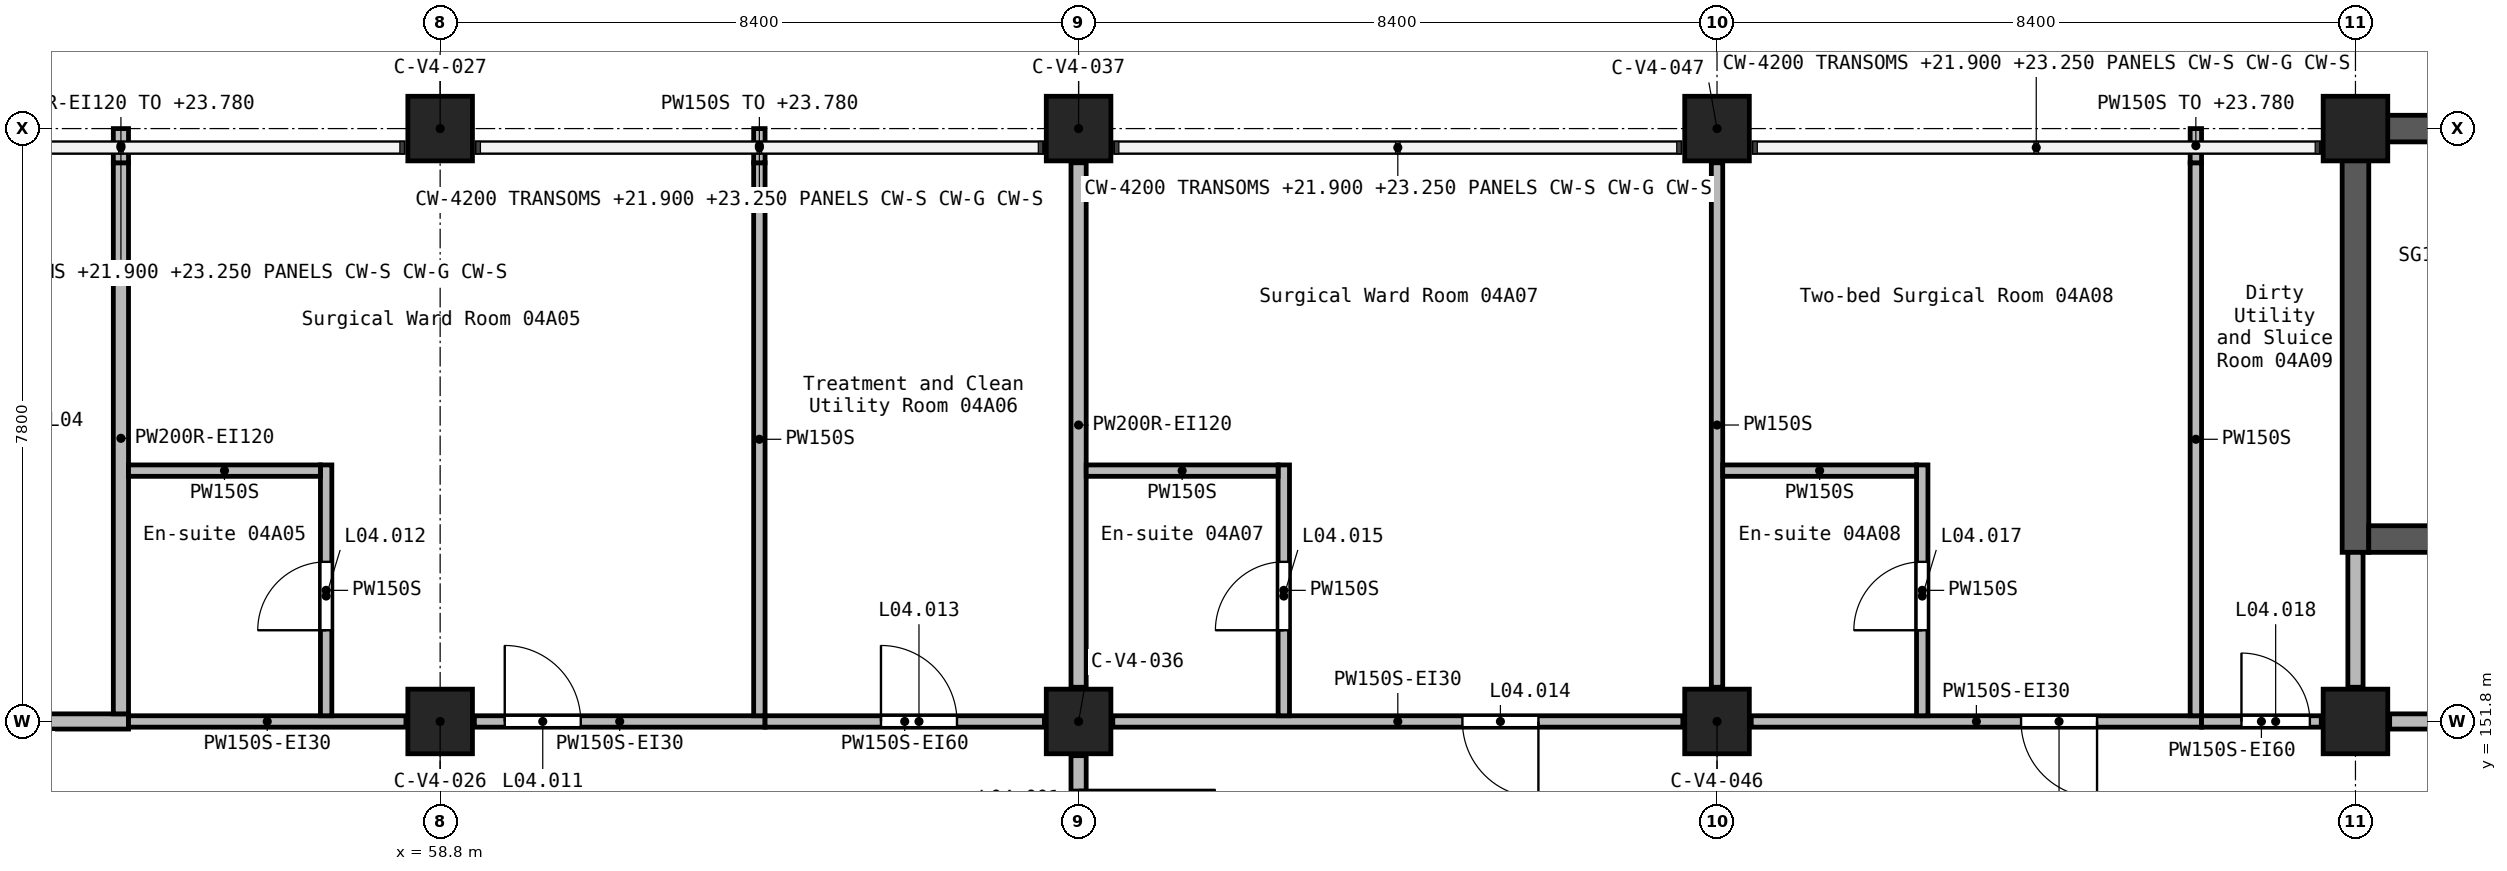
"""IFC4 building model, lengths in metres.
Left out: names, types, materials, properties, quantities, classifications, styles, units other than length and angle.
Written with IfcOpenShell. Run it as: python <this file> out.ifc"""

import sys

from ifc_helpers import new_model, si_unit, direction, frame, frame_2d, origin, origin_2d, place, context, subcontext, project, spatial, rectangle, extrude, element, fill, save


model = new_model("IFC4")
c1 = context("Model", 3, precision=1e-05, world=origin(), true_north=direction((0.0, 1.0)))
c2 = subcontext(c1, "Body", "Model", "MODEL_VIEW")
j1 = project(units=[si_unit("LENGTHUNIT", "METRE"), si_unit("PLANEANGLEUNIT", "RADIAN")], contexts=[c1])
p1 = place(None, origin())
s1 = spatial("IfcSite", under=j1, at=p1, CompositionType="ELEMENT")
p2 = place(p1, origin())
s2 = spatial("IfcBuilding", under=s1, at=p2, CompositionType="ELEMENT")
p3 = place(p2, frame((0.0, 0.0, 21.0)))
s3 = spatial("IfcBuildingStorey", under=s2, at=p3, CompositionType="ELEMENT", Elevation=21.0)
for number, where, z_axis, x_axis in (
    (1, (58.8, 151.8, 0.0), (0.0, 0.0, 1.0), (1.0, 0.0, 0.0)),
    (2, (58.8, 159.6, 0.0), (0.0, 0.0, 1.0), (1.0, 0.0, 0.0)),
    (3, (67.2, 151.8, 0.0), (0.0, 0.0, 1.0), (1.0, 0.0, 0.0)),
    (4, (67.2, 159.6, 0.0), (0.0, 0.0, 1.0), (1.0, 0.0, 0.0)),
    (5, (75.6, 151.8, 0.0), (0.0, 0.0, 1.0), (1.0, 0.0, 0.0)),
    (6, (75.6, 159.6, 0.0), (0.0, 0.0, 1.0), (1.0, 0.0, 0.0)),
    (7, (84.0, 151.8, 0.0), (0.0, 0.0, 1.0), (1.0, 0.0, 0.0)),
    (8, (84.0, 159.6, 0.0), (0.0, 0.0, 1.0), (1.0, 0.0, 0.0)),
):
    element("IfcColumn", number, at=place(p3, frame(where, z_axis=z_axis, x_axis=x_axis)), inside=s3, PredefinedType="COLUMN", context=c2, shape_type="SweptSolid", body=[
        extrude(rectangle(XDim=0.85, YDim=0.85, at=origin_2d()), origin(), (0.0, 0.0, 1.0), 3.9),
    ])
p4 = place(p3, frame((83.825, 159.6, 0.0), z_axis=(0.0, 0.0, 1.0), x_axis=(1.0, 0.0, 0.0)))
e9 = element("IfcWall", 9, at=p4, inside=s3, PredefinedType="SHEAR", context=c2, shape_type="SweptSolid", body=[
    extrude(rectangle(XDim=8.4, YDim=0.35, at=frame_2d((4.2, 0.0))), origin(), (0.0, 0.0, 1.0), 3.9),
])
p5 = place(p3, frame((84.0, 154.025, 0.0), z_axis=(0.0, 0.0, 1.0), x_axis=(0.0, 1.0, 0.0)))
e10 = element("IfcWall", 10, at=p5, inside=s3, PredefinedType="SHEAR", context=c2, shape_type="SweptSolid", body=[
    extrude(rectangle(XDim=5.4, YDim=0.35, at=frame_2d((2.7, 0.0))), origin(), (0.0, 0.0, 1.0), 3.9),
])
p6 = place(p3, frame((84.175, 154.2, 0.0), z_axis=(0.0, 0.0, 1.0), x_axis=(1.0, 0.0, 0.0)))
e11 = element("IfcWall", 11, at=p6, inside=s3, PredefinedType="SHEAR", context=c2, shape_type="SweptSolid", body=[
    extrude(rectangle(XDim=8.05, YDim=0.35, at=frame_2d((4.025, 0.0))), origin(), (0.0, 0.0, 1.0), 3.9),
])
p7 = place(p6, frame((6.525, 0.0, 0.0)))
e12 = element("IfcOpeningElement", 12, at=p7, cuts=e11, PredefinedType="OPENING", context=c2, shape_type="SweptSolid", body=[
    extrude(rectangle(XDim=1.1, YDim=2.1, at=frame_2d((0.55, 1.05))), frame((0.0, 0.185, 0.0), z_axis=(0.0, -1.0, 0.0), x_axis=(1.0, 0.0, 0.0)), (0.0, 0.0, 1.0), 0.37),
])
p8 = place(p3, frame((67.2, 159.15, 0.0), z_axis=(0.0, 0.0, 1.0), x_axis=(0.0, -1.0, 0.0)))
e13 = element("IfcWall", 13, at=p8, inside=s3, PredefinedType="SOLIDWALL", context=c2, shape_type="SweptSolid", body=[
    extrude(rectangle(XDim=6.9, YDim=0.2, at=frame_2d((3.45, 0.0))), origin(), (0.0, 0.0, 1.0), 3.6),
])
p9 = place(p3, frame((67.2, 151.35, 0.0), z_axis=(0.0, 0.0, 1.0), x_axis=(0.0, -1.0, 0.0)))
e14 = element("IfcWall", 14, at=p9, inside=s3, PredefinedType="SOLIDWALL", context=c2, shape_type="SweptSolid", body=[
    extrude(rectangle(XDim=2.7, YDim=0.2, at=frame_2d((1.35, 0.0))), origin(), (0.0, 0.0, 1.0), 3.6),
])
p10 = place(p9, frame((0.45, 0.0, 0.0)))
e15 = element("IfcOpeningElement", 15, at=p10, cuts=e14, PredefinedType="OPENING", context=c2, shape_type="SweptSolid", body=[
    extrude(rectangle(XDim=1.8, YDim=2.1, at=frame_2d((0.9, 1.05))), frame((0.0, 0.11, 0.0), z_axis=(0.0, -1.0, 0.0), x_axis=(1.0, 0.0, 0.0)), (0.0, 0.0, 1.0), 0.22),
])
p11 = place(p3, frame((50.85, 151.8, 0.0), z_axis=(0.0, 0.0, 1.0), x_axis=(1.0, 0.0, 0.0)))
e16 = element("IfcWall", 16, at=p11, inside=s3, PredefinedType="SOLIDWALL", context=c2, shape_type="SweptSolid", body=[
    extrude(rectangle(XDim=3.85, YDim=0.2, at=frame_2d((1.925, 0.0))), origin(), (0.0, 0.0, 1.0), 3.6),
])
p12 = place(p11, frame((1.15, 0.0, 0.0)))
e17 = element("IfcOpeningElement", 17, at=p12, cuts=e16, PredefinedType="OPENING", context=c2, shape_type="SweptSolid", body=[
    extrude(rectangle(XDim=1.0, YDim=2.1, at=frame_2d((0.5, 1.05))), frame((0.0, 0.11, 0.0), z_axis=(0.0, -1.0, 0.0), x_axis=(1.0, 0.0, 0.0)), (0.0, 0.0, 1.0), 0.22),
])
p13 = place(p3, frame((84.45, 151.8, 0.0), z_axis=(0.0, 0.0, 1.0), x_axis=(1.0, 0.0, 0.0)))
e18 = element("IfcWall", 18, at=p13, inside=s3, PredefinedType="SOLIDWALL", context=c2, shape_type="SweptSolid", body=[
    extrude(rectangle(XDim=7.5, YDim=0.2, at=frame_2d((3.75, 0.0))), origin(), (0.0, 0.0, 1.0), 3.6),
])
p14 = place(p13, frame((3.2, 0.0, 0.0)))
e19 = element("IfcOpeningElement", 19, at=p14, cuts=e18, PredefinedType="OPENING", context=c2, shape_type="SweptSolid", body=[
    extrude(rectangle(XDim=1.1, YDim=2.1, at=frame_2d((0.55, 1.05))), frame((0.0, 0.11, 0.0), z_axis=(0.0, -1.0, 0.0), x_axis=(1.0, 0.0, 0.0)), (0.0, 0.0, 1.0), 0.22),
])
p15 = place(p3, frame((54.6, 151.9, 0.0), z_axis=(0.0, 0.0, 1.0), x_axis=(0.0, 1.0, 0.0)))
e20 = element("IfcWall", 20, at=p15, inside=s3, PredefinedType="SOLIDWALL", context=c2, shape_type="SweptSolid", body=[
    extrude(rectangle(XDim=7.25, YDim=0.2, at=frame_2d((3.625, 0.0))), origin(), (0.0, 0.0, 1.0), 3.6),
])
p16 = place(p3, frame((54.6, 159.15, 0.0), z_axis=(0.0, 0.0, 1.0), x_axis=(0.0, 1.0, 0.0)))
e21 = element("IfcWall", 21, at=p16, inside=s3, PredefinedType="SOLIDWALL", context=c2, shape_type="SweptSolid", body=[
    extrude(rectangle(XDim=0.45, YDim=0.2, at=frame_2d((0.225, 0.0))), origin(), (0.0, 0.0, 1.0), 2.78),
])
p17 = place(p3, frame((84.0, 152.25, 0.0), z_axis=(0.0, 0.0, 1.0), x_axis=(0.0, 1.0, 0.0)))
e22 = element("IfcWall", 22, at=p17, inside=s3, PredefinedType="SOLIDWALL", context=c2, shape_type="SweptSolid", body=[
    extrude(rectangle(XDim=1.775, YDim=0.2, at=frame_2d((0.887, 0.0))), origin(), (0.0, 0.0, 1.0), 3.6),
])
p18 = place(p3, frame((81.975, 151.8, 0.0), z_axis=(0.0, 0.0, 1.0), x_axis=(-1.0, 0.0, 0.0)))
e23 = element("IfcWall", 23, at=p18, inside=s3, PredefinedType="PARTITIONING", context=c2, shape_type="SweptSolid", body=[
    extrude(rectangle(XDim=5.925, YDim=0.15, at=frame_2d((2.962, 0.0))), origin(), (0.0, 0.0, 1.0), 3.6),
])
p19 = place(p18, frame((1.375, 0.0, 0.0)))
e24 = element("IfcOpeningElement", 24, at=p19, cuts=e23, PredefinedType="OPENING", context=c2, shape_type="SweptSolid", body=[
    extrude(rectangle(XDim=1.0, YDim=2.1, at=frame_2d((0.5, 1.05))), frame((0.0, 0.085, 0.0), z_axis=(0.0, -1.0, 0.0), x_axis=(1.0, 0.0, 0.0)), (0.0, 0.0, 1.0), 0.17),
])
p20 = place(p3, frame((75.15, 151.8, 0.0), z_axis=(0.0, 0.0, 1.0), x_axis=(-1.0, 0.0, 0.0)))
e25 = element("IfcWall", 25, at=p20, inside=s3, PredefinedType="PARTITIONING", context=c2, shape_type="SweptSolid", body=[
    extrude(rectangle(XDim=7.5, YDim=0.15, at=frame_2d((3.75, 0.0))), origin(), (0.0, 0.0, 1.0), 3.6),
])
p21 = place(p20, frame((1.9, 0.0, 0.0)))
e26 = element("IfcOpeningElement", 26, at=p21, cuts=e25, PredefinedType="OPENING", context=c2, shape_type="SweptSolid", body=[
    extrude(rectangle(XDim=1.0, YDim=2.1, at=frame_2d((0.5, 1.05))), frame((0.0, 0.085, 0.0), z_axis=(0.0, -1.0, 0.0), x_axis=(1.0, 0.0, 0.0)), (0.0, 0.0, 1.0), 0.17),
])
p22 = place(p3, frame((54.7, 151.8, 0.0), z_axis=(0.0, 0.0, 1.0), x_axis=(1.0, 0.0, 0.0)))
e27 = element("IfcWall", 27, at=p22, inside=s3, PredefinedType="PARTITIONING", context=c2, shape_type="SweptSolid", body=[
    extrude(rectangle(XDim=3.65, YDim=0.15, at=frame_2d((1.825, 0.0))), origin(), (0.0, 0.0, 1.0), 3.6),
])
p23 = place(p3, frame((59.25, 151.8, 0.0), z_axis=(0.0, 0.0, 1.0), x_axis=(1.0, 0.0, 0.0)))
e28 = element("IfcWall", 28, at=p23, inside=s3, PredefinedType="PARTITIONING", context=c2, shape_type="SweptSolid", body=[
    extrude(rectangle(XDim=3.825, YDim=0.15, at=frame_2d((1.913, 0.0))), origin(), (0.0, 0.0, 1.0), 3.6),
])
p24 = place(p23, frame((0.4, 0.0, 0.0)))
e29 = element("IfcOpeningElement", 29, at=p24, cuts=e28, PredefinedType="OPENING", context=c2, shape_type="SweptSolid", body=[
    extrude(rectangle(XDim=1.0, YDim=2.1, at=frame_2d((0.5, 1.05))), frame((0.0, 0.085, 0.0), z_axis=(0.0, -1.0, 0.0), x_axis=(1.0, 0.0, 0.0)), (0.0, 0.0, 1.0), 0.17),
])
p25 = place(p3, frame((63.075, 151.8, 0.0), z_axis=(0.0, 0.0, 1.0), x_axis=(1.0, 0.0, 0.0)))
e30 = element("IfcWall", 30, at=p25, inside=s3, PredefinedType="PARTITIONING", context=c2, shape_type="SweptSolid", body=[
    extrude(rectangle(XDim=3.675, YDim=0.15, at=frame_2d((1.837, 0.0))), origin(), (0.0, 0.0, 1.0), 3.6),
])
p26 = place(p25, frame((1.525, 0.0, 0.0)))
e31 = element("IfcOpeningElement", 31, at=p26, cuts=e30, PredefinedType="OPENING", context=c2, shape_type="SweptSolid", body=[
    extrude(rectangle(XDim=1.0, YDim=2.1, at=frame_2d((0.5, 1.05))), frame((0.0, 0.085, 0.0), z_axis=(0.0, -1.0, 0.0), x_axis=(1.0, 0.0, 0.0)), (0.0, 0.0, 1.0), 0.17),
])
p27 = place(p3, frame((81.975, 151.8, 0.0), z_axis=(0.0, 0.0, 1.0), x_axis=(1.0, 0.0, 0.0)))
e32 = element("IfcWall", 32, at=p27, inside=s3, PredefinedType="PARTITIONING", context=c2, shape_type="SweptSolid", body=[
    extrude(rectangle(XDim=1.575, YDim=0.15, at=frame_2d((0.788, 0.0))), origin(), (0.0, 0.0, 1.0), 3.6),
])
p28 = place(p27, frame((0.525, 0.0, 0.0)))
e33 = element("IfcOpeningElement", 33, at=p28, cuts=e32, PredefinedType="OPENING", context=c2, shape_type="SweptSolid", body=[
    extrude(rectangle(XDim=0.9, YDim=2.1, at=frame_2d((0.45, 1.05))), frame((0.0, 0.085, 0.0), z_axis=(0.0, -1.0, 0.0), x_axis=(1.0, 0.0, 0.0)), (0.0, 0.0, 1.0), 0.17),
])
p29 = place(p3, frame((63.0, 151.875, 0.0), z_axis=(0.0, 0.0, 1.0), x_axis=(0.0, 1.0, 0.0)))
e34 = element("IfcWall", 34, at=p29, inside=s3, PredefinedType="PARTITIONING", context=c2, shape_type="SweptSolid", body=[
    extrude(rectangle(XDim=7.275, YDim=0.15, at=frame_2d((3.637, 0.0))), origin(), (0.0, 0.0, 1.0), 3.6),
])
p30 = place(p3, frame((63.0, 159.15, 0.0), z_axis=(0.0, 0.0, 1.0), x_axis=(0.0, 1.0, 0.0)))
e35 = element("IfcWall", 35, at=p30, inside=s3, PredefinedType="PARTITIONING", context=c2, shape_type="SweptSolid", body=[
    extrude(rectangle(XDim=0.45, YDim=0.15, at=frame_2d((0.225, 0.0))), origin(), (0.0, 0.0, 1.0), 2.78),
])
p31 = place(p3, frame((75.6, 152.25, 0.0), z_axis=(0.0, 0.0, 1.0), x_axis=(0.0, 1.0, 0.0)))
e36 = element("IfcWall", 36, at=p31, inside=s3, PredefinedType="PARTITIONING", context=c2, shape_type="SweptSolid", body=[
    extrude(rectangle(XDim=6.9, YDim=0.15, at=frame_2d((3.45, 0.0))), origin(), (0.0, 0.0, 1.0), 3.6),
])
p32 = place(p3, frame((81.9, 151.875, 0.0), z_axis=(0.0, 0.0, 1.0), x_axis=(0.0, 1.0, 0.0)))
e37 = element("IfcWall", 37, at=p32, inside=s3, PredefinedType="PARTITIONING", context=c2, shape_type="SweptSolid", body=[
    extrude(rectangle(XDim=7.275, YDim=0.15, at=frame_2d((3.637, 0.0))), origin(), (0.0, 0.0, 1.0), 3.6),
])
p33 = place(p3, frame((81.9, 159.15, 0.0), z_axis=(0.0, 0.0, 1.0), x_axis=(0.0, 1.0, 0.0)))
e38 = element("IfcWall", 38, at=p33, inside=s3, PredefinedType="PARTITIONING", context=c2, shape_type="SweptSolid", body=[
    extrude(rectangle(XDim=0.45, YDim=0.15, at=frame_2d((0.225, 0.0))), origin(), (0.0, 0.0, 1.0), 2.78),
])
p34 = place(p3, frame((57.3, 151.875, 0.0), z_axis=(0.0, 0.0, 1.0), x_axis=(0.0, 1.0, 0.0)))
e39 = element("IfcWall", 39, at=p34, inside=s3, PredefinedType="PARTITIONING", context=c2, shape_type="SweptSolid", body=[
    extrude(rectangle(XDim=3.3, YDim=0.15, at=frame_2d((1.65, 0.0))), origin(), (0.0, 0.0, 1.0), 3.6),
])
p35 = place(p34, frame((1.125, 0.0, 0.0)))
e40 = element("IfcOpeningElement", 40, at=p35, cuts=e39, PredefinedType="OPENING", context=c2, shape_type="SweptSolid", body=[
    extrude(rectangle(XDim=0.9, YDim=2.1, at=frame_2d((0.45, 1.05))), frame((0.0, 0.085, 0.0), z_axis=(0.0, -1.0, 0.0), x_axis=(1.0, 0.0, 0.0)), (0.0, 0.0, 1.0), 0.17),
])
p36 = place(p3, frame((69.9, 151.875, 0.0), z_axis=(0.0, 0.0, 1.0), x_axis=(0.0, 1.0, 0.0)))
e41 = element("IfcWall", 41, at=p36, inside=s3, PredefinedType="PARTITIONING", context=c2, shape_type="SweptSolid", body=[
    extrude(rectangle(XDim=3.3, YDim=0.15, at=frame_2d((1.65, 0.0))), origin(), (0.0, 0.0, 1.0), 3.6),
])
p37 = place(p36, frame((1.125, 0.0, 0.0)))
e42 = element("IfcOpeningElement", 42, at=p37, cuts=e41, PredefinedType="OPENING", context=c2, shape_type="SweptSolid", body=[
    extrude(rectangle(XDim=0.9, YDim=2.1, at=frame_2d((0.45, 1.05))), frame((0.0, 0.085, 0.0), z_axis=(0.0, -1.0, 0.0), x_axis=(1.0, 0.0, 0.0)), (0.0, 0.0, 1.0), 0.17),
])
p38 = place(p3, frame((78.3, 151.875, 0.0), z_axis=(0.0, 0.0, 1.0), x_axis=(0.0, 1.0, 0.0)))
e43 = element("IfcWall", 43, at=p38, inside=s3, PredefinedType="PARTITIONING", context=c2, shape_type="SweptSolid", body=[
    extrude(rectangle(XDim=3.3, YDim=0.15, at=frame_2d((1.65, 0.0))), origin(), (0.0, 0.0, 1.0), 3.6),
])
p39 = place(p38, frame((1.125, 0.0, 0.0)))
e44 = element("IfcOpeningElement", 44, at=p39, cuts=e43, PredefinedType="OPENING", context=c2, shape_type="SweptSolid", body=[
    extrude(rectangle(XDim=0.9, YDim=2.1, at=frame_2d((0.45, 1.05))), frame((0.0, 0.085, 0.0), z_axis=(0.0, -1.0, 0.0), x_axis=(1.0, 0.0, 0.0)), (0.0, 0.0, 1.0), 0.17),
])
p40 = place(p3, frame((67.3, 155.1, 0.0), z_axis=(0.0, 0.0, 1.0), x_axis=(1.0, 0.0, 0.0)))
e45 = element("IfcWall", 45, at=p40, inside=s3, PredefinedType="PARTITIONING", context=c2, shape_type="SweptSolid", body=[
    extrude(rectangle(XDim=2.525, YDim=0.15, at=frame_2d((1.262, 0.0))), origin(), (0.0, 0.0, 1.0), 3.6),
])
p41 = place(p3, frame((75.675, 155.1, 0.0), z_axis=(0.0, 0.0, 1.0), x_axis=(1.0, 0.0, 0.0)))
e46 = element("IfcWall", 46, at=p41, inside=s3, PredefinedType="PARTITIONING", context=c2, shape_type="SweptSolid", body=[
    extrude(rectangle(XDim=2.55, YDim=0.15, at=frame_2d((1.275, 0.0))), origin(), (0.0, 0.0, 1.0), 3.6),
])
p42 = place(p3, frame((54.7, 155.1, 0.0), z_axis=(0.0, 0.0, 1.0), x_axis=(1.0, 0.0, 0.0)))
e47 = element("IfcWall", 47, at=p42, inside=s3, PredefinedType="PARTITIONING", context=c2, shape_type="SweptSolid", body=[
    extrude(rectangle(XDim=2.525, YDim=0.15, at=frame_2d((1.263, 0.0))), origin(), (0.0, 0.0, 1.0), 3.6),
])
p43 = place(p10, origin())
e48 = element("IfcDoor", 48, at=p43, inside=s3, OperationType="DOUBLE_DOOR_SINGLE_SWING", PredefinedType="DOOR", context=c2, shape_type="SweptSolid", body=[
    extrude(rectangle(XDim=1.8, YDim=2.1, at=frame_2d((0.9, 1.05))), frame((0.0, 0.025, 0.0), z_axis=(0.0, -1.0, 0.0), x_axis=(1.0, 0.0, 0.0)), (0.0, 0.0, 1.0), 0.05),
])
fill(e15, e48)
p44 = place(p24, origin())
e49 = element("IfcDoor", 49, at=p44, inside=s3, OperationType="SINGLE_SWING_LEFT", PredefinedType="DOOR", context=c2, shape_type="SweptSolid", body=[
    extrude(rectangle(XDim=1.0, YDim=2.1, at=frame_2d((0.5, 1.05))), frame((0.0, 0.025, 0.0), z_axis=(0.0, -1.0, 0.0), x_axis=(1.0, 0.0, 0.0)), (0.0, 0.0, 1.0), 0.05),
])
fill(e29, e49)
p45 = place(p35, origin())
e50 = element("IfcDoor", 50, at=p45, inside=s3, OperationType="SINGLE_SWING_LEFT", PredefinedType="DOOR", context=c2, shape_type="SweptSolid", body=[
    extrude(rectangle(XDim=0.9, YDim=2.1, at=frame_2d((0.45, 1.05))), frame((0.0, 0.025, 0.0), z_axis=(0.0, -1.0, 0.0), x_axis=(1.0, 0.0, 0.0)), (0.0, 0.0, 1.0), 0.05),
])
fill(e40, e50)
p46 = place(p26, origin())
e51 = element("IfcDoor", 51, at=p46, inside=s3, OperationType="SINGLE_SWING_RIGHT", PredefinedType="DOOR", context=c2, shape_type="SweptSolid", body=[
    extrude(rectangle(XDim=1.0, YDim=2.1, at=frame_2d((0.5, 1.05))), frame((0.0, 0.025, 0.0), z_axis=(0.0, -1.0, 0.0), x_axis=(1.0, 0.0, 0.0)), (0.0, 0.0, 1.0), 0.05),
])
fill(e31, e51)
p47 = place(p21, frame((1.0, 0.0, 0.0), z_axis=(0.0, 0.0, 1.0), x_axis=(-1.0, 0.0, 0.0)))
e52 = element("IfcDoor", 52, at=p47, inside=s3, OperationType="SINGLE_SWING_RIGHT", PredefinedType="DOOR", context=c2, shape_type="SweptSolid", body=[
    extrude(rectangle(XDim=1.0, YDim=2.1, at=frame_2d((0.5, 1.05))), frame((0.0, 0.025, 0.0), z_axis=(0.0, -1.0, 0.0), x_axis=(1.0, 0.0, 0.0)), (0.0, 0.0, 1.0), 0.05),
])
fill(e26, e52)
p48 = place(p37, origin())
e53 = element("IfcDoor", 53, at=p48, inside=s3, OperationType="SINGLE_SWING_LEFT", PredefinedType="DOOR", context=c2, shape_type="SweptSolid", body=[
    extrude(rectangle(XDim=0.9, YDim=2.1, at=frame_2d((0.45, 1.05))), frame((0.0, 0.025, 0.0), z_axis=(0.0, -1.0, 0.0), x_axis=(1.0, 0.0, 0.0)), (0.0, 0.0, 1.0), 0.05),
])
fill(e42, e53)
p49 = place(p19, frame((1.0, 0.0, 0.0), z_axis=(0.0, 0.0, 1.0), x_axis=(-1.0, 0.0, 0.0)))
e54 = element("IfcDoor", 54, at=p49, inside=s3, OperationType="SINGLE_SWING_RIGHT", PredefinedType="DOOR", context=c2, shape_type="SweptSolid", body=[
    extrude(rectangle(XDim=1.0, YDim=2.1, at=frame_2d((0.5, 1.05))), frame((0.0, 0.025, 0.0), z_axis=(0.0, -1.0, 0.0), x_axis=(1.0, 0.0, 0.0)), (0.0, 0.0, 1.0), 0.05),
])
fill(e24, e54)
p50 = place(p39, origin())
e55 = element("IfcDoor", 55, at=p50, inside=s3, OperationType="SINGLE_SWING_LEFT", PredefinedType="DOOR", context=c2, shape_type="SweptSolid", body=[
    extrude(rectangle(XDim=0.9, YDim=2.1, at=frame_2d((0.45, 1.05))), frame((0.0, 0.025, 0.0), z_axis=(0.0, -1.0, 0.0), x_axis=(1.0, 0.0, 0.0)), (0.0, 0.0, 1.0), 0.05),
])
fill(e44, e55)
p51 = place(p28, origin())
e56 = element("IfcDoor", 56, at=p51, inside=s3, OperationType="SINGLE_SWING_RIGHT", PredefinedType="DOOR", context=c2, shape_type="SweptSolid", body=[
    extrude(rectangle(XDim=0.9, YDim=2.1, at=frame_2d((0.45, 1.05))), frame((0.0, 0.025, 0.0), z_axis=(0.0, -1.0, 0.0), x_axis=(1.0, 0.0, 0.0)), (0.0, 0.0, 1.0), 0.05),
])
fill(e33, e56)
save(model, sys.argv[1])
